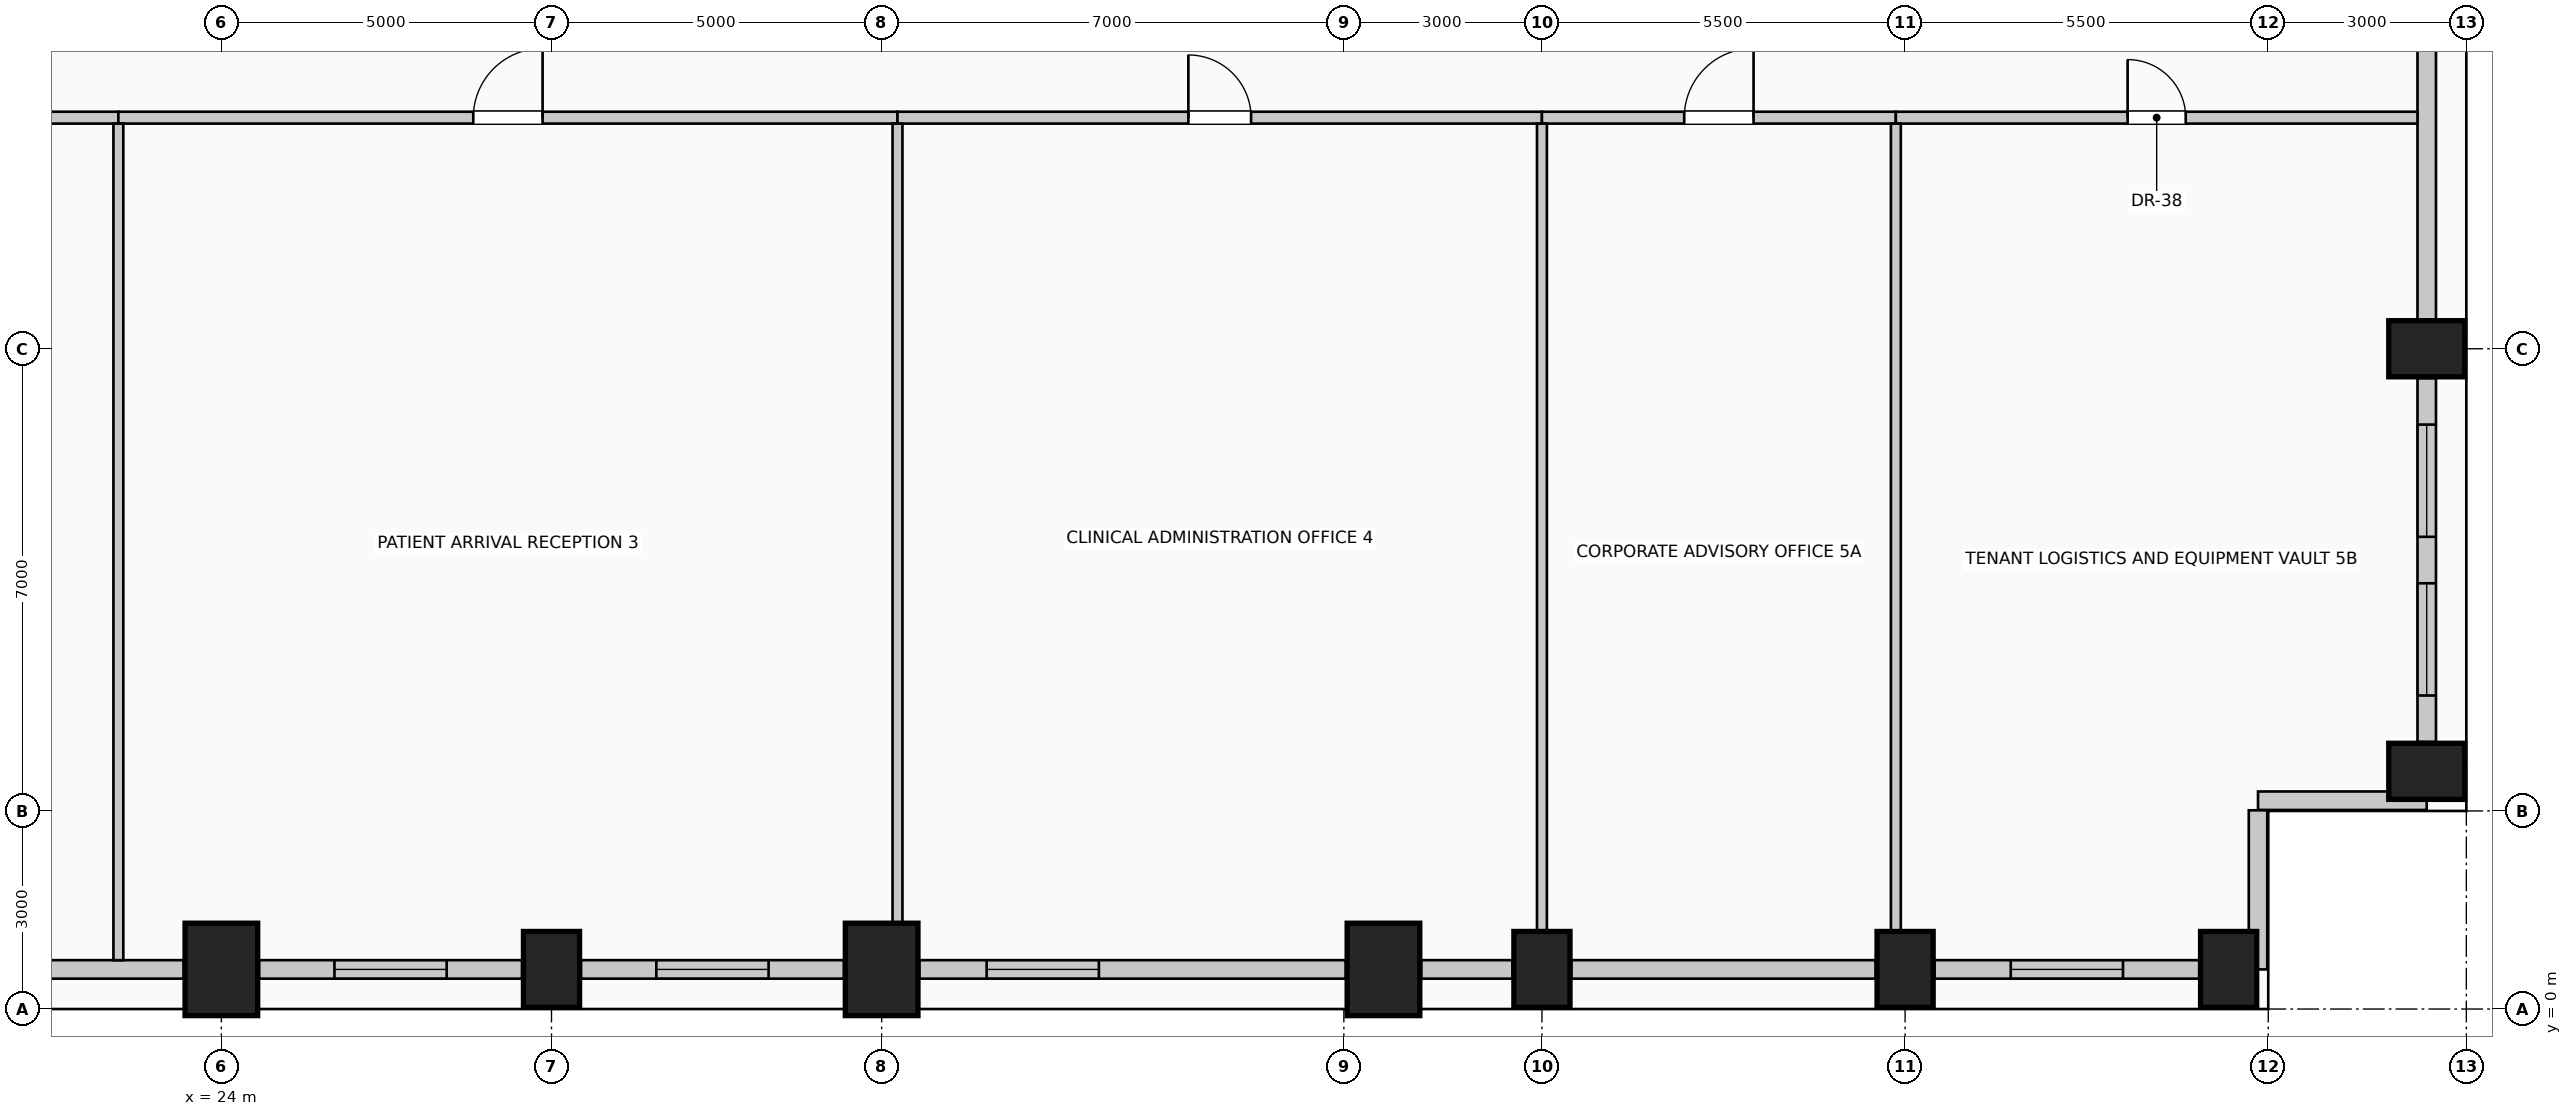
"""IFC4 building model, lengths in metres.
Left out: names, types, materials, properties, quantities, classifications, styles, units other than length and angle.
Written with IfcOpenShell. Run it as: python <this file> out.ifc"""

import sys

from ifc_helpers import new_model, si_unit, direction, frame, frame_2d, origin, origin_2d, place, context, subcontext, project, spatial, rectangle, extrude, element, fill, save


model = new_model("IFC4")
c1 = context("Model", 3, precision=1e-05, world=origin(), true_north=direction((0.0, 1.0)))
c2 = subcontext(c1, "Body", "Model", "MODEL_VIEW")
j1 = project(units=[si_unit("LENGTHUNIT", "METRE"), si_unit("PLANEANGLEUNIT", "RADIAN")], contexts=[c1])
p1 = place(None, origin())
s1 = spatial("IfcSite", under=j1, at=p1, CompositionType="ELEMENT")
p2 = place(p1, origin())
s2 = spatial("IfcBuilding", under=s1, at=p2, CompositionType="ELEMENT")
p3 = place(p2, frame((0.0, 0.0, 120.6)))
s3 = spatial("IfcBuildingStorey", under=s2, at=p3, CompositionType="ELEMENT", Elevation=120.6)
p4 = place(p3, frame((24.0, 0.6, 0.0), z_axis=(0.0, 0.0, 1.0), x_axis=(1.0, 0.0, 0.0)))
e1 = element("IfcColumn", 1, at=p4, inside=s3, PredefinedType="COLUMN", context=c2, shape_type="SweptSolid", body=[
    extrude(rectangle(XDim=1.1, YDim=1.4, at=origin_2d()), origin(), (0.0, 0.0, 1.0), 4.0),
])
p5 = place(p3, frame((29.0, 0.6, 0.0), z_axis=(0.0, 0.0, 1.0), x_axis=(1.0, 0.0, 0.0)))
e2 = element("IfcColumn", 2, at=p5, inside=s3, PredefinedType="COLUMN", context=c2, shape_type="SweptSolid", body=[
    extrude(rectangle(XDim=0.85, YDim=1.15, at=origin_2d()), origin(), (0.0, 0.0, 1.0), 4.0),
])
for number, where, z_axis, x_axis in (
    (3, (34.0, 0.6, 0.0), (0.0, 0.0, 1.0), (1.0, 0.0, 0.0)),
    (4, (41.6, 0.6, 0.0), (0.0, 0.0, 1.0), (1.0, 0.0, 0.0)),
):
    element("IfcColumn", number, at=place(p3, frame(where, z_axis=z_axis, x_axis=x_axis)), inside=s3, PredefinedType="COLUMN", context=c2, shape_type="SweptSolid", body=[
        extrude(rectangle(XDim=1.1, YDim=1.4, at=origin_2d()), origin(), (0.0, 0.0, 1.0), 4.0),
    ])
for number, where, z_axis, x_axis in (
    (5, (44.0, 0.6, 0.0), (0.0, 0.0, 1.0), (1.0, 0.0, 0.0)),
    (6, (49.5, 0.6, 0.0), (0.0, 0.0, 1.0), (1.0, 0.0, 0.0)),
    (7, (54.4, 0.6, 0.0), (0.0, 0.0, 1.0), (1.0, 0.0, 0.0)),
    (8, (57.4, 3.6, 0.0), (0.0, 0.0, 1.0), (0.0, 1.0, 0.0)),
    (9, (57.4, 10.0, 0.0), (0.0, 0.0, 1.0), (0.0, 1.0, 0.0)),
):
    element("IfcColumn", number, at=place(p3, frame(where, z_axis=z_axis, x_axis=x_axis)), inside=s3, PredefinedType="COLUMN", context=c2, shape_type="SweptSolid", body=[
        extrude(rectangle(XDim=0.85, YDim=1.15, at=origin_2d()), origin(), (0.0, 0.0, 1.0), 4.0),
    ])
p6 = place(p3, frame((23.43, 0.6, 0.0), z_axis=(0.0, 0.0, 1.0), x_axis=(-1.0, 0.0, 0.0)))
e10 = element("IfcWall", 10, at=p6, inside=s3, PredefinedType="SOLIDWALL", context=c2, shape_type="SweptSolid", body=[
    extrude(rectangle(XDim=6.46, YDim=0.28, at=frame_2d((3.23, 0.0))), origin(), (0.0, 0.0, 1.0), 2.875),
])
p7 = place(p6, frame((3.74, 0.0, 0.5)))
e11 = element("IfcOpeningElement", 11, at=p7, cuts=e10, PredefinedType="OPENING", context=c2, shape_type="SweptSolid", body=[
    extrude(rectangle(XDim=1.7, YDim=1.95, at=frame_2d((0.85, 0.975))), frame((0.0, 0.15, 0.0), z_axis=(0.0, -1.0, 0.0), x_axis=(1.0, 0.0, 0.0)), (0.0, 0.0, 1.0), 0.3),
])
p8 = place(p3, frame((28.555, 0.6, 0.0), z_axis=(0.0, 0.0, 1.0), x_axis=(-1.0, 0.0, 0.0)))
e12 = element("IfcWall", 12, at=p8, inside=s3, PredefinedType="SOLIDWALL", context=c2, shape_type="SweptSolid", body=[
    extrude(rectangle(XDim=3.985, YDim=0.28, at=frame_2d((1.992, 0.0))), origin(), (0.0, 0.0, 1.0), 2.875),
])
p9 = place(p8, frame((1.143, 0.0, 0.5)))
e13 = element("IfcOpeningElement", 13, at=p9, cuts=e12, PredefinedType="OPENING", context=c2, shape_type="SweptSolid", body=[
    extrude(rectangle(XDim=1.7, YDim=1.95, at=frame_2d((0.85, 0.975))), frame((0.0, 0.15, 0.0), z_axis=(0.0, -1.0, 0.0), x_axis=(1.0, 0.0, 0.0)), (0.0, 0.0, 1.0), 0.3),
])
p10 = place(p3, frame((33.43, 0.6, 0.0), z_axis=(0.0, 0.0, 1.0), x_axis=(-1.0, 0.0, 0.0)))
e14 = element("IfcWall", 14, at=p10, inside=s3, PredefinedType="SOLIDWALL", context=c2, shape_type="SweptSolid", body=[
    extrude(rectangle(XDim=3.985, YDim=0.28, at=frame_2d((1.992, 0.0))), origin(), (0.0, 0.0, 1.0), 2.875),
])
p11 = place(p10, frame((1.143, 0.0, 0.5)))
e15 = element("IfcOpeningElement", 15, at=p11, cuts=e14, PredefinedType="OPENING", context=c2, shape_type="SweptSolid", body=[
    extrude(rectangle(XDim=1.7, YDim=1.95, at=frame_2d((0.85, 0.975))), frame((0.0, 0.15, 0.0), z_axis=(0.0, -1.0, 0.0), x_axis=(1.0, 0.0, 0.0)), (0.0, 0.0, 1.0), 0.3),
])
p12 = place(p3, frame((41.03, 0.6, 0.0), z_axis=(0.0, 0.0, 1.0), x_axis=(-1.0, 0.0, 0.0)))
e16 = element("IfcWall", 16, at=p12, inside=s3, PredefinedType="SOLIDWALL", context=c2, shape_type="SweptSolid", body=[
    extrude(rectangle(XDim=6.46, YDim=0.28, at=frame_2d((3.23, 0.0))), origin(), (0.0, 0.0, 1.0), 2.875),
])
p13 = place(p12, frame((3.74, 0.0, 0.5)))
e17 = element("IfcOpeningElement", 17, at=p13, cuts=e16, PredefinedType="OPENING", context=c2, shape_type="SweptSolid", body=[
    extrude(rectangle(XDim=1.7, YDim=1.95, at=frame_2d((0.85, 0.975))), frame((0.0, 0.15, 0.0), z_axis=(0.0, -1.0, 0.0), x_axis=(1.0, 0.0, 0.0)), (0.0, 0.0, 1.0), 0.3),
])
p14 = place(p3, frame((43.555, 0.6, 0.0), z_axis=(0.0, 0.0, 1.0), x_axis=(-1.0, 0.0, 0.0)))
e18 = element("IfcWall", 18, at=p14, inside=s3, PredefinedType="SOLIDWALL", context=c2, shape_type="SweptSolid", body=[
    extrude(rectangle(XDim=1.385, YDim=0.28, at=frame_2d((0.692, 0.0))), origin(), (0.0, 0.0, 1.0), 2.875),
])
p15 = place(p3, frame((49.055, 0.6, 0.0), z_axis=(0.0, 0.0, 1.0), x_axis=(-1.0, 0.0, 0.0)))
e19 = element("IfcWall", 19, at=p15, inside=s3, PredefinedType="SOLIDWALL", context=c2, shape_type="SweptSolid", body=[
    extrude(rectangle(XDim=4.61, YDim=0.28, at=frame_2d((2.305, 0.0))), origin(), (0.0, 0.0, 1.0), 2.875),
])
p16 = place(p3, frame((53.955, 0.6, 0.0), z_axis=(0.0, 0.0, 1.0), x_axis=(-1.0, 0.0, 0.0)))
e20 = element("IfcWall", 20, at=p16, inside=s3, PredefinedType="SOLIDWALL", context=c2, shape_type="SweptSolid", body=[
    extrude(rectangle(XDim=4.01, YDim=0.28, at=frame_2d((2.005, 0.0))), origin(), (0.0, 0.0, 1.0), 2.875),
])
p17 = place(p16, frame((1.155, 0.0, 0.5)))
e21 = element("IfcOpeningElement", 21, at=p17, cuts=e20, PredefinedType="OPENING", context=c2, shape_type="SweptSolid", body=[
    extrude(rectangle(XDim=1.7, YDim=1.95, at=frame_2d((0.85, 0.975))), frame((0.0, 0.15, 0.0), z_axis=(0.0, -1.0, 0.0), x_axis=(1.0, 0.0, 0.0)), (0.0, 0.0, 1.0), 0.3),
])
p18 = place(p3, frame((57.4, 9.555, 0.0), z_axis=(0.0, 0.0, 1.0), x_axis=(0.0, -1.0, 0.0)))
e22 = element("IfcWall", 22, at=p18, inside=s3, PredefinedType="SOLIDWALL", context=c2, shape_type="SweptSolid", body=[
    extrude(rectangle(XDim=5.51, YDim=0.28, at=frame_2d((2.755, 0.0))), origin(), (0.0, 0.0, 1.0), 2.875),
])
p19 = place(p18, frame((0.703, 0.0, 0.5)))
e23 = element("IfcOpeningElement", 23, at=p19, cuts=e22, PredefinedType="OPENING", context=c2, shape_type="SweptSolid", body=[
    extrude(rectangle(XDim=1.7, YDim=1.95, at=frame_2d((0.85, 0.975))), frame((0.0, 0.15, 0.0), z_axis=(0.0, -1.0, 0.0), x_axis=(1.0, 0.0, 0.0)), (0.0, 0.0, 1.0), 0.3),
])
p20 = place(p18, frame((3.107, 0.0, 0.5)))
e24 = element("IfcOpeningElement", 24, at=p20, cuts=e22, PredefinedType="OPENING", context=c2, shape_type="SweptSolid", body=[
    extrude(rectangle(XDim=1.7, YDim=1.95, at=frame_2d((0.85, 0.975))), frame((0.0, 0.15, 0.0), z_axis=(0.0, -1.0, 0.0), x_axis=(1.0, 0.0, 0.0)), (0.0, 0.0, 1.0), 0.3),
])
p21 = place(p3, frame((57.4, 17.555, 0.0), z_axis=(0.0, 0.0, 1.0), x_axis=(0.0, -1.0, 0.0)))
e25 = element("IfcWall", 25, at=p21, inside=s3, PredefinedType="SOLIDWALL", context=c2, shape_type="SweptSolid", body=[
    extrude(rectangle(XDim=7.11, YDim=0.28, at=frame_2d((3.555, 0.0))), origin(), (0.0, 0.0, 1.0), 2.875),
])
p22 = place(p3, frame((57.4, 3.155, 0.0), z_axis=(0.0, 0.0, 1.0), x_axis=(-1.0, 0.0, 0.0)))
e26 = element("IfcWall", 26, at=p22, inside=s3, PredefinedType="SOLIDWALL", context=c2, shape_type="SweptSolid", body=[
    extrude(rectangle(XDim=2.555, YDim=0.28, at=frame_2d((1.277, 0.0))), origin(), (0.0, 0.0, 1.0), 3.725),
])
p23 = place(p3, frame((54.845, 3.01, 0.0), z_axis=(0.0, 0.0, 1.0), x_axis=(0.0, -1.0, 0.0)))
e27 = element("IfcWall", 27, at=p23, inside=s3, PredefinedType="SOLIDWALL", context=c2, shape_type="SweptSolid", body=[
    extrude(rectangle(XDim=2.41, YDim=0.28, at=frame_2d((1.205, 0.0))), origin(), (0.0, 0.0, 1.0), 3.725),
])
p24 = place(p3, frame((15.36, 13.5, 0.0), z_axis=(0.0, 0.0, 1.0), x_axis=(1.0, 0.0, 0.0)))
e28 = element("IfcWall", 28, at=p24, inside=s3, PredefinedType="PARTITIONING", context=c2, shape_type="SweptSolid", body=[
    extrude(rectangle(XDim=7.08, YDim=0.18, at=frame_2d((3.54, 0.0))), origin(), (0.0, 0.0, 1.0), 3.725),
])
p25 = place(p24, frame((3.065, 0.0, 0.0)))
e29 = element("IfcOpeningElement", 29, at=p25, cuts=e28, PredefinedType="OPENING", context=c2, shape_type="SweptSolid", body=[
    extrude(rectangle(XDim=0.95, YDim=2.15, at=frame_2d((0.475, 1.075))), frame((0.0, 0.1, 0.0), z_axis=(0.0, -1.0, 0.0), x_axis=(1.0, 0.0, 0.0)), (0.0, 0.0, 1.0), 0.2),
])
p26 = place(p3, frame((22.44, 13.5, 0.0), z_axis=(0.0, 0.0, 1.0), x_axis=(1.0, 0.0, 0.0)))
e30 = element("IfcWall", 30, at=p26, inside=s3, PredefinedType="PARTITIONING", context=c2, shape_type="SweptSolid", body=[
    extrude(rectangle(XDim=11.8, YDim=0.18, at=frame_2d((5.9, 0.0))), origin(), (0.0, 0.0, 1.0), 3.725),
])
p27 = place(p26, frame((5.375, 0.0, 0.0)))
e31 = element("IfcOpeningElement", 31, at=p27, cuts=e30, PredefinedType="OPENING", context=c2, shape_type="SweptSolid", body=[
    extrude(rectangle(XDim=1.05, YDim=2.15, at=frame_2d((0.525, 1.075))), frame((0.0, 0.1, 0.0), z_axis=(0.0, -1.0, 0.0), x_axis=(1.0, 0.0, 0.0)), (0.0, 0.0, 1.0), 0.2),
])
p28 = place(p3, frame((34.24, 13.5, 0.0), z_axis=(0.0, 0.0, 1.0), x_axis=(1.0, 0.0, 0.0)))
e32 = element("IfcWall", 32, at=p28, inside=s3, PredefinedType="PARTITIONING", context=c2, shape_type="SweptSolid", body=[
    extrude(rectangle(XDim=9.76, YDim=0.18, at=frame_2d((4.88, 0.0))), origin(), (0.0, 0.0, 1.0), 3.725),
])
p29 = place(p28, frame((4.405, 0.0, 0.0)))
e33 = element("IfcOpeningElement", 33, at=p29, cuts=e32, PredefinedType="OPENING", context=c2, shape_type="SweptSolid", body=[
    extrude(rectangle(XDim=0.95, YDim=2.15, at=frame_2d((0.475, 1.075))), frame((0.0, 0.1, 0.0), z_axis=(0.0, -1.0, 0.0), x_axis=(1.0, 0.0, 0.0)), (0.0, 0.0, 1.0), 0.2),
])
p30 = place(p3, frame((44.0, 13.5, 0.0), z_axis=(0.0, 0.0, 1.0), x_axis=(1.0, 0.0, 0.0)))
e34 = element("IfcWall", 34, at=p30, inside=s3, PredefinedType="PARTITIONING", context=c2, shape_type="SweptSolid", body=[
    extrude(rectangle(XDim=5.36, YDim=0.18, at=frame_2d((2.68, 0.0))), origin(), (0.0, 0.0, 1.0), 3.725),
])
p31 = place(p30, frame((2.155, 0.0, 0.0)))
e35 = element("IfcOpeningElement", 35, at=p31, cuts=e34, PredefinedType="OPENING", context=c2, shape_type="SweptSolid", body=[
    extrude(rectangle(XDim=1.05, YDim=2.15, at=frame_2d((0.525, 1.075))), frame((0.0, 0.1, 0.0), z_axis=(0.0, -1.0, 0.0), x_axis=(1.0, 0.0, 0.0)), (0.0, 0.0, 1.0), 0.2),
])
p32 = place(p3, frame((49.36, 13.5, 0.0), z_axis=(0.0, 0.0, 1.0), x_axis=(1.0, 0.0, 0.0)))
e36 = element("IfcWall", 36, at=p32, inside=s3, PredefinedType="PARTITIONING", context=c2, shape_type="SweptSolid", body=[
    extrude(rectangle(XDim=7.9, YDim=0.18, at=frame_2d((3.95, 0.0))), origin(), (0.0, 0.0, 1.0), 3.725),
])
p33 = place(p32, frame((3.51, 0.0, 0.0)))
e37 = element("IfcOpeningElement", 37, at=p33, cuts=e36, PredefinedType="OPENING", context=c2, shape_type="SweptSolid", body=[
    extrude(rectangle(XDim=0.88, YDim=2.1, at=frame_2d((0.44, 1.05))), frame((0.0, 0.1, 0.0), z_axis=(0.0, -1.0, 0.0), x_axis=(1.0, 0.0, 0.0)), (0.0, 0.0, 1.0), 0.2),
])
p34 = place(p3, frame((22.44, 0.74, 0.0), z_axis=(0.0, 0.0, 1.0), x_axis=(0.0, 1.0, 0.0)))
e38 = element("IfcWall", 38, at=p34, inside=s3, PredefinedType="PARTITIONING", context=c2, shape_type="SweptSolid", body=[
    extrude(rectangle(XDim=12.67, YDim=0.15, at=frame_2d((6.335, 0.0))), origin(), (0.0, 0.0, 1.0), 3.725),
])
p35 = place(p3, frame((34.24, 1.3, 0.0), z_axis=(0.0, 0.0, 1.0), x_axis=(0.0, 1.0, 0.0)))
e39 = element("IfcWall", 39, at=p35, inside=s3, PredefinedType="PARTITIONING", context=c2, shape_type="SweptSolid", body=[
    extrude(rectangle(XDim=12.11, YDim=0.15, at=frame_2d((6.055, 0.0))), origin(), (0.0, 0.0, 1.0), 3.725),
])
for number, where, z_axis, x_axis in (
    (40, (44.0, 1.175, 0.0), (0.0, 0.0, 1.0), (0.0, 1.0, 0.0)),
    (41, (49.36, 1.175, 0.0), (0.0, 0.0, 1.0), (0.0, 1.0, 0.0)),
):
    element("IfcWall", number, at=place(p3, frame(where, z_axis=z_axis, x_axis=x_axis)), inside=s3, PredefinedType="PARTITIONING", context=c2, shape_type="SweptSolid", body=[
        extrude(rectangle(XDim=12.235, YDim=0.15, at=frame_2d((6.117, 0.0))), origin(), (0.0, 0.0, 1.0), 3.725),
    ])
p36 = place(p9, origin())
e42 = element("IfcWindow", 42, at=p36, inside=s3, PartitioningType="SINGLE_PANEL", PredefinedType="WINDOW", context=c2, shape_type="SweptSolid", body=[
    extrude(rectangle(XDim=1.7, YDim=1.95, at=frame_2d((0.85, 0.975))), frame((0.0, 0.03, 0.0), z_axis=(0.0, -1.0, 0.0), x_axis=(1.0, 0.0, 0.0)), (0.0, 0.0, 1.0), 0.06),
])
fill(e13, e42)
p37 = place(p11, origin())
e43 = element("IfcWindow", 43, at=p37, inside=s3, PartitioningType="SINGLE_PANEL", PredefinedType="WINDOW", context=c2, shape_type="SweptSolid", body=[
    extrude(rectangle(XDim=1.7, YDim=1.95, at=frame_2d((0.85, 0.975))), frame((0.0, 0.03, 0.0), z_axis=(0.0, -1.0, 0.0), x_axis=(1.0, 0.0, 0.0)), (0.0, 0.0, 1.0), 0.06),
])
fill(e15, e43)
p38 = place(p13, origin())
e44 = element("IfcWindow", 44, at=p38, inside=s3, PartitioningType="SINGLE_PANEL", PredefinedType="WINDOW", context=c2, shape_type="SweptSolid", body=[
    extrude(rectangle(XDim=1.7, YDim=1.95, at=frame_2d((0.85, 0.975))), frame((0.0, 0.03, 0.0), z_axis=(0.0, -1.0, 0.0), x_axis=(1.0, 0.0, 0.0)), (0.0, 0.0, 1.0), 0.06),
])
fill(e17, e44)
p39 = place(p17, origin())
e45 = element("IfcWindow", 45, at=p39, inside=s3, PartitioningType="SINGLE_PANEL", PredefinedType="WINDOW", context=c2, shape_type="SweptSolid", body=[
    extrude(rectangle(XDim=1.7, YDim=1.95, at=frame_2d((0.85, 0.975))), frame((0.0, 0.03, 0.0), z_axis=(0.0, -1.0, 0.0), x_axis=(1.0, 0.0, 0.0)), (0.0, 0.0, 1.0), 0.06),
])
fill(e21, e45)
p40 = place(p19, origin())
e46 = element("IfcWindow", 46, at=p40, inside=s3, PartitioningType="SINGLE_PANEL", PredefinedType="WINDOW", context=c2, shape_type="SweptSolid", body=[
    extrude(rectangle(XDim=1.7, YDim=1.95, at=frame_2d((0.85, 0.975))), frame((0.0, 0.03, 0.0), z_axis=(0.0, -1.0, 0.0), x_axis=(1.0, 0.0, 0.0)), (0.0, 0.0, 1.0), 0.06),
])
fill(e23, e46)
p41 = place(p20, origin())
e47 = element("IfcWindow", 47, at=p41, inside=s3, PartitioningType="SINGLE_PANEL", PredefinedType="WINDOW", context=c2, shape_type="SweptSolid", body=[
    extrude(rectangle(XDim=1.7, YDim=1.95, at=frame_2d((0.85, 0.975))), frame((0.0, 0.03, 0.0), z_axis=(0.0, -1.0, 0.0), x_axis=(1.0, 0.0, 0.0)), (0.0, 0.0, 1.0), 0.06),
])
fill(e24, e47)
p42 = place(p27, origin())
e48 = element("IfcDoor", 48, at=p42, inside=s3, OperationType="SINGLE_SWING_RIGHT", PredefinedType="DOOR", context=c2, shape_type="SweptSolid", body=[
    extrude(rectangle(XDim=1.05, YDim=2.15, at=frame_2d((0.525, 1.075))), frame((0.0, 0.025, 0.0), z_axis=(0.0, -1.0, 0.0), x_axis=(1.0, 0.0, 0.0)), (0.0, 0.0, 1.0), 0.05),
])
fill(e31, e48)
p43 = place(p29, origin())
e49 = element("IfcDoor", 49, at=p43, inside=s3, OperationType="SINGLE_SWING_LEFT", PredefinedType="DOOR", context=c2, shape_type="SweptSolid", body=[
    extrude(rectangle(XDim=0.95, YDim=2.15, at=frame_2d((0.475, 1.075))), frame((0.0, 0.025, 0.0), z_axis=(0.0, -1.0, 0.0), x_axis=(1.0, 0.0, 0.0)), (0.0, 0.0, 1.0), 0.05),
])
fill(e33, e49)
p44 = place(p31, origin())
e50 = element("IfcDoor", 50, at=p44, inside=s3, OperationType="SINGLE_SWING_RIGHT", PredefinedType="DOOR", context=c2, shape_type="SweptSolid", body=[
    extrude(rectangle(XDim=1.05, YDim=2.15, at=frame_2d((0.525, 1.075))), frame((0.0, 0.025, 0.0), z_axis=(0.0, -1.0, 0.0), x_axis=(1.0, 0.0, 0.0)), (0.0, 0.0, 1.0), 0.05),
])
fill(e35, e50)
p45 = place(p33, origin())
e51 = element("IfcDoor", 51, at=p45, inside=s3, OperationType="SINGLE_SWING_LEFT", PredefinedType="DOOR", context=c2, shape_type="SweptSolid", body=[
    extrude(rectangle(XDim=0.88, YDim=2.1, at=frame_2d((0.44, 1.05))), frame((0.0, 0.025, 0.0), z_axis=(0.0, -1.0, 0.0), x_axis=(1.0, 0.0, 0.0)), (0.0, 0.0, 1.0), 0.05),
])
fill(e37, e51)
save(model, sys.argv[1])
